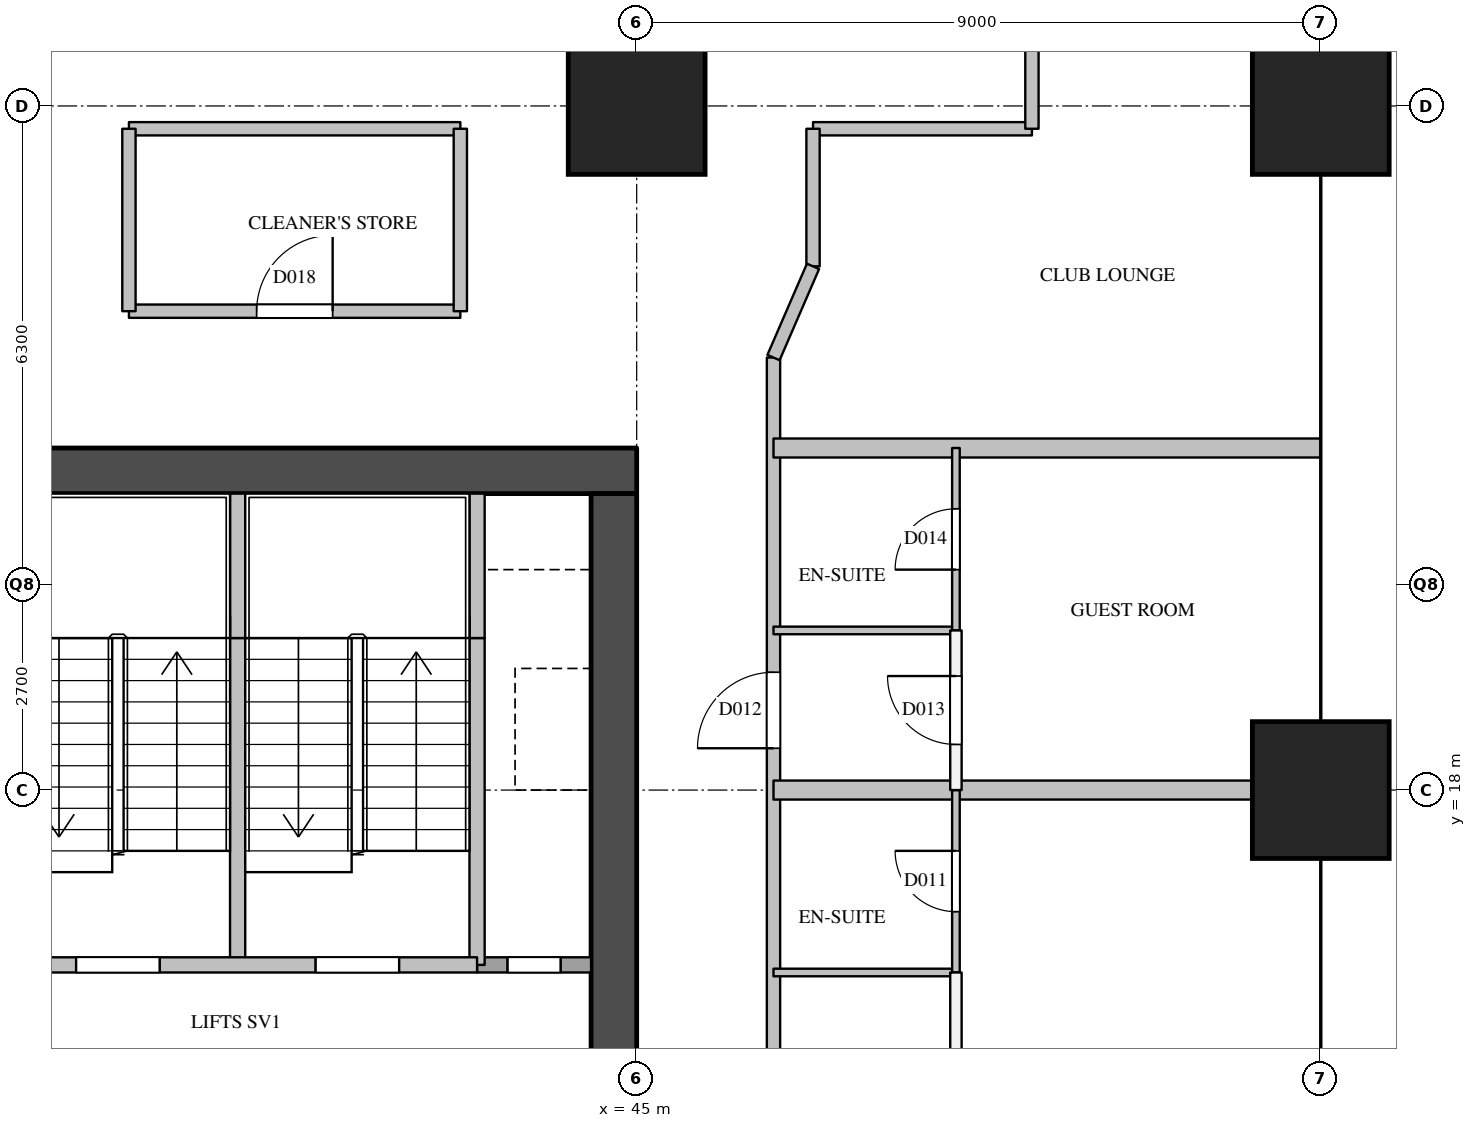
"""IFC4 building model, lengths in metres.
Left out: names, types, materials, properties, quantities, classifications, styles, units other than length and angle.
Written with IfcOpenShell. Run it as: python <this file> out.ifc"""

import sys

from ifc_helpers import new_model, si_unit, direction, frame, frame_2d, origin, origin_2d, place, context, subcontext, project, spatial, rectangle, extrude, element, fill, save


model = new_model("IFC4")
c1 = context("Model", 3, precision=1e-05, world=origin(), true_north=direction((0.0, 1.0)))
c2 = subcontext(c1, "Body", "Model", "MODEL_VIEW")
j1 = project(units=[si_unit("LENGTHUNIT", "METRE"), si_unit("PLANEANGLEUNIT", "RADIAN")], contexts=[c1])
p1 = place(None, origin())
s1 = spatial("IfcSite", under=j1, at=p1, CompositionType="ELEMENT")
p2 = place(p1, origin())
s2 = spatial("IfcBuilding", under=s1, at=p2, CompositionType="ELEMENT")
p3 = place(p2, frame((0.0, 0.0, 104.4)))
s3 = spatial("IfcBuildingStorey", under=s2, at=p3, CompositionType="ELEMENT", Elevation=104.4)
for number, where, z_axis, x_axis in (
    (1, (45.0, 27.0, 0.0), (0.0, 0.0, 1.0), (1.0, 0.0, 0.0)),
    (2, (54.0, 18.0, 0.0), (0.0, 0.0, 1.0), (1.0, 0.0, 0.0)),
    (3, (54.0, 27.0, 0.0), (0.0, 0.0, 1.0), (1.0, 0.0, 0.0)),
):
    element("IfcColumn", number, at=place(p3, frame(where, z_axis=z_axis, x_axis=x_axis)), inside=s3, PredefinedType="COLUMN", context=c2, shape_type="SweptSolid", body=[
        extrude(rectangle(XDim=1.8, YDim=1.8, at=origin_2d()), origin(), (0.0, 0.0, 1.0), 3.8),
    ])
p4 = place(p3, frame((36.0, 22.2, 0.0), z_axis=(0.0, 0.0, 1.0), x_axis=(1.0, 0.0, 0.0)))
e4 = element("IfcWall", 4, at=p4, inside=s3, PredefinedType="SHEAR", context=c2, shape_type="SweptSolid", body=[
    extrude(rectangle(XDim=9.0, YDim=0.6, at=frame_2d((4.5, 0.0))), origin(), (0.0, 0.0, 1.0), 3.5),
])
p5 = place(p3, frame((44.7, 9.6, 0.0), z_axis=(0.0, 0.0, 1.0), x_axis=(0.0, 1.0, 0.0)))
e5 = element("IfcWall", 5, at=p5, inside=s3, PredefinedType="SHEAR", context=c2, shape_type="SweptSolid", body=[
    extrude(rectangle(XDim=12.3, YDim=0.6, at=frame_2d((6.15, 0.0))), origin(), (0.0, 0.0, 1.0), 3.5),
])
p6 = place(p5, frame((0.8, 0.0, 0.0)))
e6 = element("IfcOpeningElement", 6, at=p6, cuts=e5, PredefinedType="OPENING", context=c2, shape_type="SweptSolid", body=[
    extrude(rectangle(XDim=0.7, YDim=2.1, at=frame_2d((0.35, 1.05))), frame((0.0, 0.31, 0.0), z_axis=(0.0, -1.0, 0.0), x_axis=(1.0, 0.0, 0.0)), (0.0, 0.0, 1.0), 0.62),
])
p7 = place(p3, frame((39.75, 15.7, 0.0), z_axis=(0.0, 0.0, 1.0), x_axis=(0.0, 1.0, 0.0)))
e7 = element("IfcWall", 7, at=p7, inside=s3, PredefinedType="SOLIDWALL", context=c2, shape_type="SweptSolid", body=[
    extrude(rectangle(XDim=4.3, YDim=0.2, at=frame_2d((2.15, 0.0))), origin(), (0.0, 0.0, 1.0), 3.5),
])
p8 = place(p3, frame((39.75, 20.0, 0.0), z_axis=(0.0, 0.0, 1.0), x_axis=(0.0, 1.0, 0.0)))
e8 = element("IfcWall", 8, at=p8, inside=s3, PredefinedType="SOLIDWALL", context=c2, shape_type="SweptSolid", body=[
    extrude(rectangle(XDim=1.9, YDim=0.2, at=frame_2d((0.95, 0.0))), origin(), (0.0, 0.0, 1.0), 3.5),
])
p9 = place(p3, frame((42.9, 15.7, 0.0), z_axis=(0.0, 0.0, 1.0), x_axis=(0.0, 1.0, 0.0)))
e9 = element("IfcWall", 9, at=p9, inside=s3, PredefinedType="SOLIDWALL", context=c2, shape_type="SweptSolid", body=[
    extrude(rectangle(XDim=4.3, YDim=0.2, at=frame_2d((2.15, 0.0))), origin(), (0.0, 0.0, 1.0), 3.5),
])
p10 = place(p3, frame((42.9, 20.0, 0.0), z_axis=(0.0, 0.0, 1.0), x_axis=(0.0, 1.0, 0.0)))
e10 = element("IfcWall", 10, at=p10, inside=s3, PredefinedType="SOLIDWALL", context=c2, shape_type="SweptSolid", body=[
    extrude(rectangle(XDim=1.9, YDim=0.2, at=frame_2d((0.95, 0.0))), origin(), (0.0, 0.0, 1.0), 3.5),
])
p11 = place(p3, frame((42.9, 15.7, 0.0), z_axis=(0.0, 0.0, 1.0), x_axis=(1.0, 0.0, 0.0)))
e11 = element("IfcWall", 11, at=p11, inside=s3, PredefinedType="SOLIDWALL", context=c2, shape_type="SweptSolid", body=[
    extrude(rectangle(XDim=1.5, YDim=0.2, at=frame_2d((0.75, 0.0))), origin(), (0.0, 0.0, 1.0), 3.5),
])
p12 = place(p11, frame((0.4, 0.0, 0.0)))
e12 = element("IfcOpeningElement", 12, at=p12, cuts=e11, PredefinedType="OPENING", context=c2, shape_type="SweptSolid", body=[
    extrude(rectangle(XDim=0.7, YDim=2.1, at=frame_2d((0.35, 1.05))), frame((0.0, 0.11, 0.0), z_axis=(0.0, -1.0, 0.0), x_axis=(1.0, 0.0, 0.0)), (0.0, 0.0, 1.0), 0.22),
])
p13 = place(p3, frame((36.6, 15.7, 0.0), z_axis=(0.0, 0.0, 1.0), x_axis=(1.0, 0.0, 0.0)))
e13 = element("IfcWall", 13, at=p13, inside=s3, PredefinedType="SOLIDWALL", context=c2, shape_type="SweptSolid", body=[
    extrude(rectangle(XDim=6.3, YDim=0.2, at=frame_2d((3.15, 0.0))), origin(), (0.0, 0.0, 1.0), 3.5),
])
p14 = place(p13, frame((1.025, 0.0, 0.0)))
e14 = element("IfcOpeningElement", 14, at=p14, cuts=e13, PredefinedType="OPENING", context=c2, shape_type="SweptSolid", body=[
    extrude(rectangle(XDim=1.1, YDim=2.1, at=frame_2d((0.55, 1.05))), frame((0.0, 0.11, 0.0), z_axis=(0.0, -1.0, 0.0), x_axis=(1.0, 0.0, 0.0)), (0.0, 0.0, 1.0), 0.22),
])
p15 = place(p13, frame((4.175, 0.0, 0.0)))
e15 = element("IfcOpeningElement", 15, at=p15, cuts=e13, PredefinedType="OPENING", context=c2, shape_type="SweptSolid", body=[
    extrude(rectangle(XDim=1.1, YDim=2.1, at=frame_2d((0.55, 1.05))), frame((0.0, 0.11, 0.0), z_axis=(0.0, -1.0, 0.0), x_axis=(1.0, 0.0, 0.0)), (0.0, 0.0, 1.0), 0.22),
])
p16 = place(p3, frame((38.32, 24.3, 0.0), z_axis=(0.0, 0.0, 1.0), x_axis=(1.0, 0.0, 0.0)))
e16 = element("IfcWall", 16, at=p16, inside=s3, PredefinedType="PARTITIONING", context=c2, shape_type="SweptSolid", body=[
    extrude(rectangle(XDim=4.36, YDim=0.175, at=frame_2d((2.18, 0.0))), origin(), (0.0, 0.0, 1.0), 3.5),
])
p17 = place(p16, frame((1.68, 0.0, 0.0)))
e17 = element("IfcOpeningElement", 17, at=p17, cuts=e16, PredefinedType="OPENING", context=c2, shape_type="SweptSolid", body=[
    extrude(rectangle(XDim=1.0, YDim=2.1, at=frame_2d((0.5, 1.05))), frame((0.0, 0.097, 0.0), z_axis=(0.0, -1.0, 0.0), x_axis=(1.0, 0.0, 0.0)), (0.0, 0.0, 1.0), 0.195),
])
p18 = place(p3, frame((38.32, 26.7, 0.0), z_axis=(0.0, 0.0, 1.0), x_axis=(1.0, 0.0, 0.0)))
e18 = element("IfcWall", 18, at=p18, inside=s3, PredefinedType="PARTITIONING", context=c2, shape_type="SweptSolid", body=[
    extrude(rectangle(XDim=4.36, YDim=0.175, at=frame_2d((2.18, 0.0))), origin(), (0.0, 0.0, 1.0), 2.5),
])
p19 = place(p3, frame((47.32, 26.7, 0.0), z_axis=(0.0, 0.0, 1.0), x_axis=(1.0, 0.0, 0.0)))
e19 = element("IfcWall", 19, at=p19, inside=s3, PredefinedType="PARTITIONING", context=c2, shape_type="SweptSolid", body=[
    extrude(rectangle(XDim=2.88, YDim=0.175, at=frame_2d((1.44, 0.0))), origin(), (0.0, 0.0, 1.0), 2.5),
])
for number, where, z_axis, x_axis in (
    (20, (38.32, 24.3, 0.0), (0.0, 0.0, 1.0), (0.0, 1.0, 0.0)),
    (21, (42.68, 24.3, 0.0), (0.0, 0.0, 1.0), (0.0, 1.0, 0.0)),
):
    element("IfcWall", number, at=place(p3, frame(where, z_axis=z_axis, x_axis=x_axis)), inside=s3, PredefinedType="PARTITIONING", context=c2, shape_type="SweptSolid", body=[
        extrude(rectangle(XDim=2.4, YDim=0.175, at=frame_2d((1.2, 0.0))), origin(), (0.0, 0.0, 1.0), 2.5),
    ])
p20 = place(p3, frame((46.8, 7.2, 0.0), z_axis=(0.0, 0.0, 1.0), x_axis=(0.0, 1.0, 0.0)))
e22 = element("IfcWall", 22, at=p20, inside=s3, PredefinedType="PARTITIONING", context=c2, shape_type="SweptSolid", body=[
    extrude(rectangle(XDim=16.49, YDim=0.175, at=frame_2d((8.245, 0.0))), origin(), (0.0, 0.0, 1.0), 3.5),
])
p21 = place(p20, frame((0.45, 0.0, 0.0)))
e23 = element("IfcOpeningElement", 23, at=p21, cuts=e22, PredefinedType="OPENING", context=c2, shape_type="SweptSolid", body=[
    extrude(rectangle(XDim=0.9, YDim=2.1, at=frame_2d((0.45, 1.05))), frame((0.0, 0.097, 0.0), z_axis=(0.0, -1.0, 0.0), x_axis=(1.0, 0.0, 0.0)), (0.0, 0.0, 1.0), 0.195),
])
p22 = place(p20, frame((4.6, 0.0, 0.0)))
e24 = element("IfcOpeningElement", 24, at=p22, cuts=e22, PredefinedType="OPENING", context=c2, shape_type="SweptSolid", body=[
    extrude(rectangle(XDim=1.0, YDim=2.1, at=frame_2d((0.5, 1.05))), frame((0.0, 0.097, 0.0), z_axis=(0.0, -1.0, 0.0), x_axis=(1.0, 0.0, 0.0)), (0.0, 0.0, 1.0), 0.195),
])
p23 = place(p20, frame((11.35, 0.0, 0.0)))
e25 = element("IfcOpeningElement", 25, at=p23, cuts=e22, PredefinedType="OPENING", context=c2, shape_type="SweptSolid", body=[
    extrude(rectangle(XDim=1.0, YDim=2.1, at=frame_2d((0.5, 1.05))), frame((0.0, 0.097, 0.0), z_axis=(0.0, -1.0, 0.0), x_axis=(1.0, 0.0, 0.0)), (0.0, 0.0, 1.0), 0.195),
])
p24 = place(p3, frame((47.32, 24.89, 0.0), z_axis=(0.0, 0.0, 1.0), x_axis=(0.0, 1.0, 0.0)))
e26 = element("IfcWall", 26, at=p24, inside=s3, PredefinedType="PARTITIONING", context=c2, shape_type="SweptSolid", body=[
    extrude(rectangle(XDim=1.81, YDim=0.175, at=frame_2d((0.905, 0.0))), origin(), (0.0, 0.0, 1.0), 2.5),
])
p25 = place(p3, frame((50.2, 26.7, 0.0), z_axis=(0.0, 0.0, 1.0), x_axis=(0.0, 1.0, 0.0)))
e27 = element("IfcWall", 27, at=p25, inside=s3, PredefinedType="PARTITIONING", context=c2, shape_type="SweptSolid", body=[
    extrude(rectangle(XDim=25.1, YDim=0.175, at=frame_2d((12.55, 0.0))), origin(), (0.0, 0.0, 1.0), 2.5),
])
p26 = place(p25, frame((4.2, 0.0, 0.0)))
e28 = element("IfcOpeningElement", 28, at=p26, cuts=e27, PredefinedType="OPENING", context=c2, shape_type="SweptSolid", body=[
    extrude(rectangle(XDim=0.9, YDim=2.1, at=frame_2d((0.45, 1.05))), frame((0.0, 0.097, 0.0), z_axis=(0.0, -1.0, 0.0), x_axis=(1.0, 0.0, 0.0)), (0.0, 0.0, 1.0), 0.195),
])
p27 = place(p25, frame((15.6, 0.0, 0.0)))
e29 = element("IfcOpeningElement", 29, at=p27, cuts=e27, PredefinedType="OPENING", context=c2, shape_type="SweptSolid", body=[
    extrude(rectangle(XDim=0.9, YDim=2.1, at=frame_2d((0.45, 1.05))), frame((0.0, 0.097, 0.0), z_axis=(0.0, -1.0, 0.0), x_axis=(1.0, 0.0, 0.0)), (0.0, 0.0, 1.0), 0.195),
])
p28 = place(p3, frame((49.2, 9.0, 0.0), z_axis=(0.0, 0.0, 1.0), x_axis=(0.0, 1.0, 0.0)))
e30 = element("IfcWall", 30, at=p28, inside=s3, PredefinedType="PARTITIONING", context=c2, shape_type="SweptSolid", body=[
    extrude(rectangle(XDim=6.6, YDim=0.15, at=frame_2d((3.3, 0.0))), origin(), (0.0, 0.0, 1.0), 3.5),
])
p29 = place(p28, frame((2.85, 0.0, 0.0)))
e31 = element("IfcOpeningElement", 31, at=p29, cuts=e30, PredefinedType="OPENING", context=c2, shape_type="SweptSolid", body=[
    extrude(rectangle(XDim=0.9, YDim=2.1, at=frame_2d((0.45, 1.05))), frame((0.0, 0.085, 0.0), z_axis=(0.0, -1.0, 0.0), x_axis=(1.0, 0.0, 0.0)), (0.0, 0.0, 1.0), 0.17),
])
p30 = place(p3, frame((49.2, 18.0, 0.0), z_axis=(0.0, 0.0, 1.0), x_axis=(0.0, 1.0, 0.0)))
e32 = element("IfcWall", 32, at=p30, inside=s3, PredefinedType="PARTITIONING", context=c2, shape_type="SweptSolid", body=[
    extrude(rectangle(XDim=2.1, YDim=0.15, at=frame_2d((1.05, 0.0))), origin(), (0.0, 0.0, 1.0), 3.5),
])
p31 = place(p30, frame((0.6, 0.0, 0.0)))
e33 = element("IfcOpeningElement", 33, at=p31, cuts=e32, PredefinedType="OPENING", context=c2, shape_type="SweptSolid", body=[
    extrude(rectangle(XDim=0.9, YDim=2.1, at=frame_2d((0.45, 1.05))), frame((0.0, 0.085, 0.0), z_axis=(0.0, -1.0, 0.0), x_axis=(1.0, 0.0, 0.0)), (0.0, 0.0, 1.0), 0.17),
])
p32 = place(p3, frame((46.8, 18.0, 0.0), z_axis=(0.0, 0.0, 1.0), x_axis=(1.0, 0.0, 0.0)))
e34 = element("IfcWall", 34, at=p32, inside=s3, PredefinedType="PARTITIONING", context=c2, shape_type="SweptSolid", body=[
    extrude(rectangle(XDim=7.2, YDim=0.25, at=frame_2d((3.6, 0.0))), origin(), (0.0, 0.0, 1.0), 3.5),
])
p33 = place(p3, frame((46.8, 22.5, 0.0), z_axis=(0.0, 0.0, 1.0), x_axis=(1.0, 0.0, 0.0)))
e35 = element("IfcWall", 35, at=p33, inside=s3, PredefinedType="PARTITIONING", context=c2, shape_type="SweptSolid", body=[
    extrude(rectangle(XDim=7.2, YDim=0.25, at=frame_2d((3.6, 0.0))), origin(), (0.0, 0.0, 1.0), 2.5),
])
for number, where, z_axis, x_axis in (
    (36, (46.8, 15.6, 0.0), (0.0, 0.0, 1.0), (1.0, 0.0, 0.0)),
    (37, (46.8, 20.1, 0.0), (0.0, 0.0, 1.0), (1.0, 0.0, 0.0)),
):
    element("IfcWall", number, at=place(p3, frame(where, z_axis=z_axis, x_axis=x_axis)), inside=s3, PredefinedType="PARTITIONING", context=c2, shape_type="SweptSolid", body=[
        extrude(rectangle(XDim=2.4, YDim=0.1, at=frame_2d((1.2, 0.0))), origin(), (0.0, 0.0, 1.0), 3.5),
    ])
p34 = place(p3, frame((49.2, 15.6, 0.0), z_axis=(0.0, 0.0, 1.0), x_axis=(0.0, 1.0, 0.0)))
e38 = element("IfcWall", 38, at=p34, inside=s3, PredefinedType="PARTITIONING", context=c2, shape_type="SweptSolid", body=[
    extrude(rectangle(XDim=2.4, YDim=0.1, at=frame_2d((1.2, 0.0))), origin(), (0.0, 0.0, 1.0), 3.5),
])
p35 = place(p34, frame((0.8, 0.0, 0.0)))
e39 = element("IfcOpeningElement", 39, at=p35, cuts=e38, PredefinedType="OPENING", context=c2, shape_type="SweptSolid", body=[
    extrude(rectangle(XDim=0.8, YDim=2.1, at=frame_2d((0.4, 1.05))), frame((0.0, 0.06, 0.0), z_axis=(0.0, -1.0, 0.0), x_axis=(1.0, 0.0, 0.0)), (0.0, 0.0, 1.0), 0.12),
])
p36 = place(p3, frame((49.2, 20.1, 0.0), z_axis=(0.0, 0.0, 1.0), x_axis=(0.0, 1.0, 0.0)))
e40 = element("IfcWall", 40, at=p36, inside=s3, PredefinedType="PARTITIONING", context=c2, shape_type="SweptSolid", body=[
    extrude(rectangle(XDim=2.4, YDim=0.1, at=frame_2d((1.2, 0.0))), origin(), (0.0, 0.0, 1.0), 3.5),
])
p37 = place(p36, frame((0.8, 0.0, 0.0)))
e41 = element("IfcOpeningElement", 41, at=p37, cuts=e40, PredefinedType="OPENING", context=c2, shape_type="SweptSolid", body=[
    extrude(rectangle(XDim=0.8, YDim=2.1, at=frame_2d((0.4, 1.05))), frame((0.0, 0.06, 0.0), z_axis=(0.0, -1.0, 0.0), x_axis=(1.0, 0.0, 0.0)), (0.0, 0.0, 1.0), 0.12),
])
p38 = place(p3, frame((47.32, 24.89, 0.0), z_axis=(0.0, 0.0, 1.0), x_axis=(-0.397633632391, -0.917544273804, 0.0)))
e42 = element("IfcWall", 42, at=p38, inside=s3, PredefinedType="PARTITIONING", context=c2, shape_type="SweptSolid", body=[
    extrude(rectangle(XDim=1.308, YDim=0.175, at=frame_2d((0.654, 0.0))), origin(), (0.0, 0.0, 1.0), 3.5),
])
p39 = place(p14, origin())
e43 = element("IfcDoor", 43, at=p39, inside=s3, OperationType="SINGLE_SWING_LEFT", PredefinedType="DOOR", context=c2, shape_type="SweptSolid", body=[
    extrude(rectangle(XDim=1.1, YDim=2.1, at=frame_2d((0.55, 1.05))), frame((0.0, 0.025, 0.0), z_axis=(0.0, -1.0, 0.0), x_axis=(1.0, 0.0, 0.0)), (0.0, 0.0, 1.0), 0.05),
])
fill(e14, e43)
p40 = place(p15, origin())
e44 = element("IfcDoor", 44, at=p40, inside=s3, OperationType="SINGLE_SWING_RIGHT", PredefinedType="DOOR", context=c2, shape_type="SweptSolid", body=[
    extrude(rectangle(XDim=1.1, YDim=2.1, at=frame_2d((0.55, 1.05))), frame((0.0, 0.025, 0.0), z_axis=(0.0, -1.0, 0.0), x_axis=(1.0, 0.0, 0.0)), (0.0, 0.0, 1.0), 0.05),
])
fill(e15, e44)
p41 = place(p12, origin())
e45 = element("IfcDoor", 45, at=p41, inside=s3, OperationType="SINGLE_SWING_LEFT", PredefinedType="DOOR", context=c2, shape_type="SweptSolid", body=[
    extrude(rectangle(XDim=0.7, YDim=2.1, at=frame_2d((0.35, 1.05))), frame((0.0, 0.025, 0.0), z_axis=(0.0, -1.0, 0.0), x_axis=(1.0, 0.0, 0.0)), (0.0, 0.0, 1.0), 0.05),
])
fill(e12, e45)
p42 = place(p35, origin())
e46 = element("IfcDoor", 46, at=p42, inside=s3, OperationType="SINGLE_SWING_RIGHT", PredefinedType="DOOR", context=c2, shape_type="SweptSolid", body=[
    extrude(rectangle(XDim=0.8, YDim=2.1, at=frame_2d((0.4, 1.05))), frame((0.0, 0.025, 0.0), z_axis=(0.0, -1.0, 0.0), x_axis=(1.0, 0.0, 0.0)), (0.0, 0.0, 1.0), 0.05),
])
fill(e39, e46)
p43 = place(p23, origin())
e47 = element("IfcDoor", 47, at=p43, inside=s3, OperationType="SINGLE_SWING_LEFT", PredefinedType="DOOR", context=c2, shape_type="SweptSolid", body=[
    extrude(rectangle(XDim=1.0, YDim=2.1, at=frame_2d((0.5, 1.05))), frame((0.0, 0.025, 0.0), z_axis=(0.0, -1.0, 0.0), x_axis=(1.0, 0.0, 0.0)), (0.0, 0.0, 1.0), 0.05),
])
fill(e25, e47)
p44 = place(p31, origin())
e48 = element("IfcDoor", 48, at=p44, inside=s3, OperationType="SINGLE_SWING_RIGHT", PredefinedType="DOOR", context=c2, shape_type="SweptSolid", body=[
    extrude(rectangle(XDim=0.9, YDim=2.1, at=frame_2d((0.45, 1.05))), frame((0.0, 0.025, 0.0), z_axis=(0.0, -1.0, 0.0), x_axis=(1.0, 0.0, 0.0)), (0.0, 0.0, 1.0), 0.05),
])
fill(e33, e48)
p45 = place(p37, origin())
e49 = element("IfcDoor", 49, at=p45, inside=s3, OperationType="SINGLE_SWING_LEFT", PredefinedType="DOOR", context=c2, shape_type="SweptSolid", body=[
    extrude(rectangle(XDim=0.8, YDim=2.1, at=frame_2d((0.4, 1.05))), frame((0.0, 0.025, 0.0), z_axis=(0.0, -1.0, 0.0), x_axis=(1.0, 0.0, 0.0)), (0.0, 0.0, 1.0), 0.05),
])
fill(e41, e49)
p46 = place(p17, origin())
e50 = element("IfcDoor", 50, at=p46, inside=s3, OperationType="SINGLE_SWING_RIGHT", PredefinedType="DOOR", context=c2, shape_type="SweptSolid", body=[
    extrude(rectangle(XDim=1.0, YDim=2.1, at=frame_2d((0.5, 1.05))), frame((0.0, 0.025, 0.0), z_axis=(0.0, -1.0, 0.0), x_axis=(1.0, 0.0, 0.0)), (0.0, 0.0, 1.0), 0.05),
])
fill(e17, e50)
save(model, sys.argv[1])
